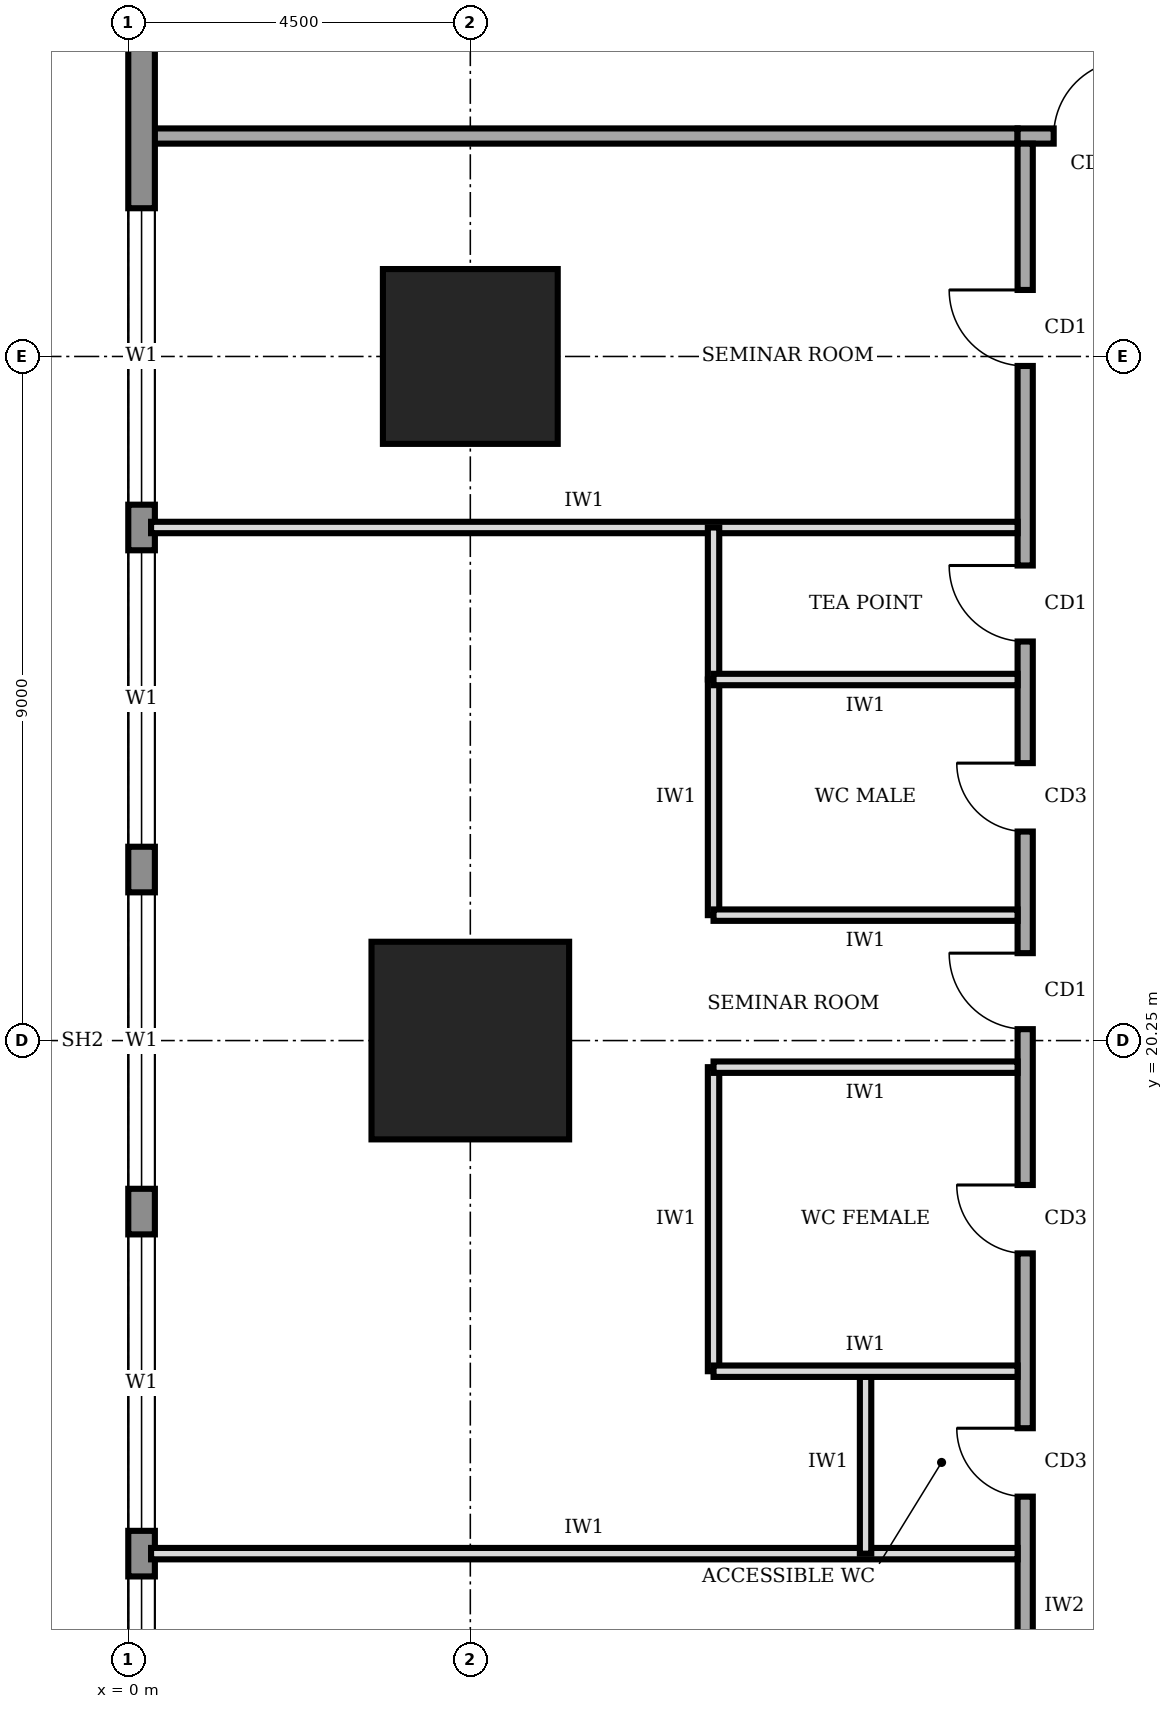
"""IFC4 building model, lengths in metres.
Left out: names, types, materials, properties, quantities, classifications, styles, units other than length and angle.
Written with IfcOpenShell. Run it as: python <this file> out.ifc"""

import sys

from ifc_helpers import new_model, si_unit, direction, frame, frame_2d, origin, origin_2d, place, context, subcontext, project, spatial, rectangle, extrude, element, fill, save


model = new_model("IFC4")
c1 = context("Model", 3, precision=1e-05, world=origin(), true_north=direction((0.0, 1.0)))
c2 = subcontext(c1, "Body", "Model", "MODEL_VIEW")
j1 = project(units=[si_unit("LENGTHUNIT", "METRE"), si_unit("PLANEANGLEUNIT", "RADIAN")], contexts=[c1])
p1 = place(None, origin())
s1 = spatial("IfcSite", under=j1, at=p1, CompositionType="ELEMENT")
p2 = place(p1, origin())
s2 = spatial("IfcBuilding", under=s1, at=p2, CompositionType="ELEMENT")
p3 = place(p2, frame((0.0, 0.0, 113.0)))
s3 = spatial("IfcBuildingStorey", under=s2, at=p3, CompositionType="ELEMENT", Elevation=113.0)
p4 = place(p3, frame((4.5, 20.25, 0.0), z_axis=(0.0, 0.0, 1.0), x_axis=(1.0, 0.0, 0.0)))
e1 = element("IfcColumn", 1, at=p4, inside=s3, PredefinedType="COLUMN", context=c2, shape_type="SweptSolid", body=[
    extrude(rectangle(XDim=2.6, YDim=2.6, at=origin_2d()), origin(), (0.0, 0.0, 1.0), 4.0),
])
p5 = place(p3, frame((4.5, 29.25, 0.0), z_axis=(0.0, 0.0, 1.0), x_axis=(1.0, 0.0, 0.0)))
e2 = element("IfcColumn", 2, at=p5, inside=s3, PredefinedType="COLUMN", context=c2, shape_type="SweptSolid", body=[
    extrude(rectangle(XDim=2.3, YDim=2.3, at=origin_2d()), origin(), (0.0, 0.0, 1.0), 4.0),
])
p6 = place(p3, frame((0.175, 35.98, 0.0), z_axis=(0.0, 0.0, 1.0), x_axis=(0.0, -1.0, 0.0)))
e3 = element("IfcWall", 3, at=p6, inside=s3, PredefinedType="STANDARD", context=c2, shape_type="SweptSolid", body=[
    extrude(rectangle(XDim=31.46, YDim=0.35, at=frame_2d((15.73, 0.0))), origin(), (0.0, 0.0, 1.0), 3.75),
])
p7 = place(p6, frame((27.21, 0.0, 0.9)))
e4 = element("IfcOpeningElement", 4, at=p7, cuts=e3, PredefinedType="OPENING", context=c2, shape_type="SweptSolid", body=[
    extrude(rectangle(XDim=3.9, YDim=2.2, at=frame_2d((1.95, 1.1))), frame((0.0, 0.185, 0.0), z_axis=(0.0, -1.0, 0.0), x_axis=(1.0, 0.0, 0.0)), (0.0, 0.0, 1.0), 0.37),
])
p8 = place(p6, frame((22.78, 0.0, 0.9)))
e5 = element("IfcOpeningElement", 5, at=p8, cuts=e3, PredefinedType="OPENING", context=c2, shape_type="SweptSolid", body=[
    extrude(rectangle(XDim=3.9, YDim=2.2, at=frame_2d((1.95, 1.1))), frame((0.0, 0.185, 0.0), z_axis=(0.0, -1.0, 0.0), x_axis=(1.0, 0.0, 0.0)), (0.0, 0.0, 1.0), 0.37),
])
p9 = place(p6, frame((18.28, 0.0, 0.9)))
e6 = element("IfcOpeningElement", 6, at=p9, cuts=e3, PredefinedType="OPENING", context=c2, shape_type="SweptSolid", body=[
    extrude(rectangle(XDim=3.9, YDim=2.2, at=frame_2d((1.95, 1.1))), frame((0.0, 0.185, 0.0), z_axis=(0.0, -1.0, 0.0), x_axis=(1.0, 0.0, 0.0)), (0.0, 0.0, 1.0), 0.37),
])
p10 = place(p6, frame((13.78, 0.0, 0.9)))
e7 = element("IfcOpeningElement", 7, at=p10, cuts=e3, PredefinedType="OPENING", context=c2, shape_type="SweptSolid", body=[
    extrude(rectangle(XDim=3.9, YDim=2.2, at=frame_2d((1.95, 1.1))), frame((0.0, 0.185, 0.0), z_axis=(0.0, -1.0, 0.0), x_axis=(1.0, 0.0, 0.0)), (0.0, 0.0, 1.0), 0.37),
])
p11 = place(p6, frame((9.28, 0.0, 0.9)))
e8 = element("IfcOpeningElement", 8, at=p11, cuts=e3, PredefinedType="OPENING", context=c2, shape_type="SweptSolid", body=[
    extrude(rectangle(XDim=3.9, YDim=2.2, at=frame_2d((1.95, 1.1))), frame((0.0, 0.185, 0.0), z_axis=(0.0, -1.0, 0.0), x_axis=(1.0, 0.0, 0.0)), (0.0, 0.0, 1.0), 0.37),
])
p12 = place(p6, frame((4.78, 0.0, 0.9)))
e9 = element("IfcOpeningElement", 9, at=p12, cuts=e3, PredefinedType="OPENING", context=c2, shape_type="SweptSolid", body=[
    extrude(rectangle(XDim=3.9, YDim=2.2, at=frame_2d((1.95, 1.1))), frame((0.0, 0.185, 0.0), z_axis=(0.0, -1.0, 0.0), x_axis=(1.0, 0.0, 0.0)), (0.0, 0.0, 1.0), 0.37),
])
p13 = place(p3, frame((28.6, 32.15, 0.0), z_axis=(0.0, 0.0, 1.0), x_axis=(-1.0, 0.0, 0.0)))
e10 = element("IfcWall", 10, at=p13, inside=s3, PredefinedType="SOLIDWALL", context=c2, shape_type="SweptSolid", body=[
    extrude(rectangle(XDim=16.9, YDim=0.2, at=frame_2d((8.45, 0.0))), origin(), (0.0, 0.0, 1.0), 3.75),
])
p14 = place(p13, frame((15.425, 0.0, 0.0)))
e11 = element("IfcOpeningElement", 11, at=p14, cuts=e10, PredefinedType="OPENING", context=c2, shape_type="SweptSolid", body=[
    extrude(rectangle(XDim=1.0, YDim=2.1, at=frame_2d((0.5, 1.05))), frame((0.0, 0.11, 0.0), z_axis=(0.0, -1.0, 0.0), x_axis=(1.0, 0.0, 0.0)), (0.0, 0.0, 1.0), 0.22),
])
p15 = place(p13, frame((12.35, 0.0, 0.0)))
e12 = element("IfcOpeningElement", 12, at=p15, cuts=e10, PredefinedType="OPENING", context=c2, shape_type="SweptSolid", body=[
    extrude(rectangle(XDim=1.0, YDim=2.1, at=frame_2d((0.5, 1.05))), frame((0.0, 0.11, 0.0), z_axis=(0.0, -1.0, 0.0), x_axis=(1.0, 0.0, 0.0)), (0.0, 0.0, 1.0), 0.22),
])
p16 = place(p13, frame((5.6, 0.0, 0.0)))
e13 = element("IfcOpeningElement", 13, at=p16, cuts=e10, PredefinedType="OPENING", context=c2, shape_type="SweptSolid", body=[
    extrude(rectangle(XDim=1.0, YDim=2.1, at=frame_2d((0.5, 1.05))), frame((0.0, 0.11, 0.0), z_axis=(0.0, -1.0, 0.0), x_axis=(1.0, 0.0, 0.0)), (0.0, 0.0, 1.0), 0.22),
])
p17 = place(p13, frame((0.275, 0.0, 0.0)))
e14 = element("IfcOpeningElement", 14, at=p17, cuts=e10, PredefinedType="OPENING", context=c2, shape_type="SweptSolid", body=[
    extrude(rectangle(XDim=1.0, YDim=2.1, at=frame_2d((0.5, 1.05))), frame((0.0, 0.11, 0.0), z_axis=(0.0, -1.0, 0.0), x_axis=(1.0, 0.0, 0.0)), (0.0, 0.0, 1.0), 0.22),
])
p18 = place(p3, frame((11.8, 32.05, 0.0), z_axis=(0.0, 0.0, 1.0), x_axis=(0.0, -1.0, 0.0)))
e15 = element("IfcWall", 15, at=p18, inside=s3, PredefinedType="SOLIDWALL", context=c2, shape_type="SweptSolid", body=[
    extrude(rectangle(XDim=23.8, YDim=0.2, at=frame_2d((11.9, 0.0))), origin(), (0.0, 0.0, 1.0), 3.75),
])
p19 = place(p18, frame((20.675, 0.0, 0.0)))
e16 = element("IfcOpeningElement", 16, at=p19, cuts=e15, PredefinedType="OPENING", context=c2, shape_type="SweptSolid", body=[
    extrude(rectangle(XDim=1.0, YDim=2.1, at=frame_2d((0.5, 1.05))), frame((0.0, 0.11, 0.0), z_axis=(0.0, -1.0, 0.0), x_axis=(1.0, 0.0, 0.0)), (0.0, 0.0, 1.0), 0.22),
])
p20 = place(p18, frame((16.9, 0.0, 0.0)))
e17 = element("IfcOpeningElement", 17, at=p20, cuts=e15, PredefinedType="OPENING", context=c2, shape_type="SweptSolid", body=[
    extrude(rectangle(XDim=0.9, YDim=2.1, at=frame_2d((0.45, 1.05))), frame((0.0, 0.11, 0.0), z_axis=(0.0, -1.0, 0.0), x_axis=(1.0, 0.0, 0.0)), (0.0, 0.0, 1.0), 0.22),
])
p21 = place(p18, frame((13.7, 0.0, 0.0)))
e18 = element("IfcOpeningElement", 18, at=p21, cuts=e15, PredefinedType="OPENING", context=c2, shape_type="SweptSolid", body=[
    extrude(rectangle(XDim=0.9, YDim=2.1, at=frame_2d((0.45, 1.05))), frame((0.0, 0.11, 0.0), z_axis=(0.0, -1.0, 0.0), x_axis=(1.0, 0.0, 0.0)), (0.0, 0.0, 1.0), 0.22),
])
p22 = place(p18, frame((8.15, 0.0, 0.0)))
e19 = element("IfcOpeningElement", 19, at=p22, cuts=e15, PredefinedType="OPENING", context=c2, shape_type="SweptSolid", body=[
    extrude(rectangle(XDim=0.9, YDim=2.1, at=frame_2d((0.45, 1.05))), frame((0.0, 0.11, 0.0), z_axis=(0.0, -1.0, 0.0), x_axis=(1.0, 0.0, 0.0)), (0.0, 0.0, 1.0), 0.22),
])
p23 = place(p18, frame((5.55, 0.0, 0.0)))
e20 = element("IfcOpeningElement", 20, at=p23, cuts=e15, PredefinedType="OPENING", context=c2, shape_type="SweptSolid", body=[
    extrude(rectangle(XDim=1.0, YDim=2.1, at=frame_2d((0.5, 1.05))), frame((0.0, 0.11, 0.0), z_axis=(0.0, -1.0, 0.0), x_axis=(1.0, 0.0, 0.0)), (0.0, 0.0, 1.0), 0.22),
])
p24 = place(p18, frame((10.65, 0.0, 0.0)))
e21 = element("IfcOpeningElement", 21, at=p24, cuts=e15, PredefinedType="OPENING", context=c2, shape_type="SweptSolid", body=[
    extrude(rectangle(XDim=1.0, YDim=2.1, at=frame_2d((0.5, 1.05))), frame((0.0, 0.11, 0.0), z_axis=(0.0, -1.0, 0.0), x_axis=(1.0, 0.0, 0.0)), (0.0, 0.0, 1.0), 0.22),
])
p25 = place(p18, frame((1.925, 0.0, 0.0)))
e22 = element("IfcOpeningElement", 22, at=p25, cuts=e15, PredefinedType="OPENING", context=c2, shape_type="SweptSolid", body=[
    extrude(rectangle(XDim=1.0, YDim=2.1, at=frame_2d((0.5, 1.05))), frame((0.0, 0.11, 0.0), z_axis=(0.0, -1.0, 0.0), x_axis=(1.0, 0.0, 0.0)), (0.0, 0.0, 1.0), 0.22),
])
p26 = place(p3, frame((0.3, 32.15, 0.0), z_axis=(0.0, 0.0, 1.0), x_axis=(1.0, 0.0, 0.0)))
e23 = element("IfcWall", 23, at=p26, inside=s3, PredefinedType="SOLIDWALL", context=c2, shape_type="SweptSolid", body=[
    extrude(rectangle(XDim=11.4, YDim=0.2, at=frame_2d((5.7, 0.0))), origin(), (0.0, 0.0, 1.0), 3.75),
])
for number, where, z_axis, x_axis in (
    (24, (0.3, 13.5, 0.0), (0.0, 0.0, 1.0), (1.0, 0.0, 0.0)),
    (25, (0.3, 27.0, 0.0), (0.0, 0.0, 1.0), (1.0, 0.0, 0.0)),
):
    element("IfcWall", number, at=place(p3, frame(where, z_axis=z_axis, x_axis=x_axis)), inside=s3, PredefinedType="PARTITIONING", context=c2, shape_type="SweptSolid", body=[
        extrude(rectangle(XDim=11.4, YDim=0.15, at=frame_2d((5.7, 0.0))), origin(), (0.0, 0.0, 1.0), 3.75),
    ])
p27 = place(p3, frame((11.7, 15.9, 0.0), z_axis=(0.0, 0.0, 1.0), x_axis=(-1.0, 0.0, 0.0)))
e26 = element("IfcWall", 26, at=p27, inside=s3, PredefinedType="PARTITIONING", context=c2, shape_type="SweptSolid", body=[
    extrude(rectangle(XDim=4.0, YDim=0.15, at=frame_2d((2.0, 0.0))), origin(), (0.0, 0.0, 1.0), 3.75),
])
p28 = place(p3, frame((11.7, 19.9, 0.0), z_axis=(0.0, 0.0, 1.0), x_axis=(-1.0, 0.0, 0.0)))
e27 = element("IfcWall", 27, at=p28, inside=s3, PredefinedType="PARTITIONING", context=c2, shape_type="SweptSolid", body=[
    extrude(rectangle(XDim=4.0, YDim=0.15, at=frame_2d((2.0, 0.0))), origin(), (0.0, 0.0, 1.0), 2.85),
])
for number, where, z_axis, x_axis in (
    (28, (11.7, 21.9, 0.0), (0.0, 0.0, 1.0), (-1.0, 0.0, 0.0)),
    (29, (11.7, 25.0, 0.0), (0.0, 0.0, 1.0), (-1.0, 0.0, 0.0)),
):
    element("IfcWall", number, at=place(p3, frame(where, z_axis=z_axis, x_axis=x_axis)), inside=s3, PredefinedType="PARTITIONING", context=c2, shape_type="SweptSolid", body=[
        extrude(rectangle(XDim=4.0, YDim=0.15, at=frame_2d((2.0, 0.0))), origin(), (0.0, 0.0, 1.0), 3.75),
    ])
p29 = place(p3, frame((9.7, 13.5, 0.0), z_axis=(0.0, 0.0, 1.0), x_axis=(0.0, 1.0, 0.0)))
e30 = element("IfcWall", 30, at=p29, inside=s3, PredefinedType="PARTITIONING", context=c2, shape_type="SweptSolid", body=[
    extrude(rectangle(XDim=2.4, YDim=0.15, at=frame_2d((1.2, 0.0))), origin(), (0.0, 0.0, 1.0), 3.75),
])
p30 = place(p3, frame((7.7, 15.9, 0.0), z_axis=(0.0, 0.0, 1.0), x_axis=(0.0, 1.0, 0.0)))
e31 = element("IfcWall", 31, at=p30, inside=s3, PredefinedType="PARTITIONING", context=c2, shape_type="SweptSolid", body=[
    extrude(rectangle(XDim=4.0, YDim=0.15, at=frame_2d((2.0, 0.0))), origin(), (0.0, 0.0, 1.0), 3.75),
])
p31 = place(p3, frame((7.7, 21.9, 0.0), z_axis=(0.0, 0.0, 1.0), x_axis=(0.0, 1.0, 0.0)))
e32 = element("IfcWall", 32, at=p31, inside=s3, PredefinedType="PARTITIONING", context=c2, shape_type="SweptSolid", body=[
    extrude(rectangle(XDim=3.1, YDim=0.15, at=frame_2d((1.55, 0.0))), origin(), (0.0, 0.0, 1.0), 3.75),
])
p32 = place(p3, frame((7.7, 25.0, 0.0), z_axis=(0.0, 0.0, 1.0), x_axis=(0.0, 1.0, 0.0)))
e33 = element("IfcWall", 33, at=p32, inside=s3, PredefinedType="PARTITIONING", context=c2, shape_type="SweptSolid", body=[
    extrude(rectangle(XDim=2.0, YDim=0.15, at=frame_2d((1.0, 0.0))), origin(), (0.0, 0.0, 1.0), 3.75),
])
p33 = place(p8, origin())
e34 = element("IfcWindow", 34, at=p33, inside=s3, PartitioningType="SINGLE_PANEL", PredefinedType="WINDOW", context=c2, shape_type="SweptSolid", body=[
    extrude(rectangle(XDim=3.9, YDim=2.2, at=frame_2d((1.95, 1.1))), frame((0.0, 0.03, 0.0), z_axis=(0.0, -1.0, 0.0), x_axis=(1.0, 0.0, 0.0)), (0.0, 0.0, 1.0), 0.06),
])
fill(e5, e34)
p34 = place(p9, origin())
e35 = element("IfcWindow", 35, at=p34, inside=s3, PartitioningType="SINGLE_PANEL", PredefinedType="WINDOW", context=c2, shape_type="SweptSolid", body=[
    extrude(rectangle(XDim=3.9, YDim=2.2, at=frame_2d((1.95, 1.1))), frame((0.0, 0.03, 0.0), z_axis=(0.0, -1.0, 0.0), x_axis=(1.0, 0.0, 0.0)), (0.0, 0.0, 1.0), 0.06),
])
fill(e6, e35)
p35 = place(p10, origin())
e36 = element("IfcWindow", 36, at=p35, inside=s3, PartitioningType="SINGLE_PANEL", PredefinedType="WINDOW", context=c2, shape_type="SweptSolid", body=[
    extrude(rectangle(XDim=3.9, YDim=2.2, at=frame_2d((1.95, 1.1))), frame((0.0, 0.03, 0.0), z_axis=(0.0, -1.0, 0.0), x_axis=(1.0, 0.0, 0.0)), (0.0, 0.0, 1.0), 0.06),
])
fill(e7, e36)
p36 = place(p11, origin())
e37 = element("IfcWindow", 37, at=p36, inside=s3, PartitioningType="SINGLE_PANEL", PredefinedType="WINDOW", context=c2, shape_type="SweptSolid", body=[
    extrude(rectangle(XDim=3.9, YDim=2.2, at=frame_2d((1.95, 1.1))), frame((0.0, 0.03, 0.0), z_axis=(0.0, -1.0, 0.0), x_axis=(1.0, 0.0, 0.0)), (0.0, 0.0, 1.0), 0.06),
])
fill(e8, e37)
p37 = place(p12, origin())
e38 = element("IfcWindow", 38, at=p37, inside=s3, PartitioningType="SINGLE_PANEL", PredefinedType="WINDOW", context=c2, shape_type="SweptSolid", body=[
    extrude(rectangle(XDim=3.9, YDim=2.2, at=frame_2d((1.95, 1.1))), frame((0.0, 0.03, 0.0), z_axis=(0.0, -1.0, 0.0), x_axis=(1.0, 0.0, 0.0)), (0.0, 0.0, 1.0), 0.06),
])
fill(e9, e38)
p38 = place(p14, frame((1.0, 0.0, 0.0), z_axis=(0.0, 0.0, 1.0), x_axis=(-1.0, 0.0, 0.0)))
e39 = element("IfcDoor", 39, at=p38, inside=s3, OperationType="SINGLE_SWING_RIGHT", PredefinedType="DOOR", context=c2, shape_type="SweptSolid", body=[
    extrude(rectangle(XDim=1.0, YDim=2.1, at=frame_2d((0.5, 1.05))), frame((0.0, 0.025, 0.0), z_axis=(0.0, -1.0, 0.0), x_axis=(1.0, 0.0, 0.0)), (0.0, 0.0, 1.0), 0.05),
])
fill(e11, e39)
p39 = place(p20, frame((0.9, 0.0, 0.0), z_axis=(0.0, 0.0, 1.0), x_axis=(-1.0, 0.0, 0.0)))
e40 = element("IfcDoor", 40, at=p39, inside=s3, OperationType="SINGLE_SWING_RIGHT", PredefinedType="DOOR", context=c2, shape_type="SweptSolid", body=[
    extrude(rectangle(XDim=0.9, YDim=2.1, at=frame_2d((0.45, 1.05))), frame((0.0, 0.025, 0.0), z_axis=(0.0, -1.0, 0.0), x_axis=(1.0, 0.0, 0.0)), (0.0, 0.0, 1.0), 0.05),
])
fill(e17, e40)
p40 = place(p21, frame((0.9, 0.0, 0.0), z_axis=(0.0, 0.0, 1.0), x_axis=(-1.0, 0.0, 0.0)))
e41 = element("IfcDoor", 41, at=p40, inside=s3, OperationType="SINGLE_SWING_RIGHT", PredefinedType="DOOR", context=c2, shape_type="SweptSolid", body=[
    extrude(rectangle(XDim=0.9, YDim=2.1, at=frame_2d((0.45, 1.05))), frame((0.0, 0.025, 0.0), z_axis=(0.0, -1.0, 0.0), x_axis=(1.0, 0.0, 0.0)), (0.0, 0.0, 1.0), 0.05),
])
fill(e18, e41)
p41 = place(p22, frame((0.9, 0.0, 0.0), z_axis=(0.0, 0.0, 1.0), x_axis=(-1.0, 0.0, 0.0)))
e42 = element("IfcDoor", 42, at=p41, inside=s3, OperationType="SINGLE_SWING_RIGHT", PredefinedType="DOOR", context=c2, shape_type="SweptSolid", body=[
    extrude(rectangle(XDim=0.9, YDim=2.1, at=frame_2d((0.45, 1.05))), frame((0.0, 0.025, 0.0), z_axis=(0.0, -1.0, 0.0), x_axis=(1.0, 0.0, 0.0)), (0.0, 0.0, 1.0), 0.05),
])
fill(e19, e42)
p42 = place(p23, frame((1.0, 0.0, 0.0), z_axis=(0.0, 0.0, 1.0), x_axis=(-1.0, 0.0, 0.0)))
e43 = element("IfcDoor", 43, at=p42, inside=s3, OperationType="SINGLE_SWING_RIGHT", PredefinedType="DOOR", context=c2, shape_type="SweptSolid", body=[
    extrude(rectangle(XDim=1.0, YDim=2.1, at=frame_2d((0.5, 1.05))), frame((0.0, 0.025, 0.0), z_axis=(0.0, -1.0, 0.0), x_axis=(1.0, 0.0, 0.0)), (0.0, 0.0, 1.0), 0.05),
])
fill(e20, e43)
p43 = place(p24, frame((1.0, 0.0, 0.0), z_axis=(0.0, 0.0, 1.0), x_axis=(-1.0, 0.0, 0.0)))
e44 = element("IfcDoor", 44, at=p43, inside=s3, OperationType="SINGLE_SWING_RIGHT", PredefinedType="DOOR", context=c2, shape_type="SweptSolid", body=[
    extrude(rectangle(XDim=1.0, YDim=2.1, at=frame_2d((0.5, 1.05))), frame((0.0, 0.025, 0.0), z_axis=(0.0, -1.0, 0.0), x_axis=(1.0, 0.0, 0.0)), (0.0, 0.0, 1.0), 0.05),
])
fill(e21, e44)
p44 = place(p25, frame((1.0, 0.0, 0.0), z_axis=(0.0, 0.0, 1.0), x_axis=(-1.0, 0.0, 0.0)))
e45 = element("IfcDoor", 45, at=p44, inside=s3, OperationType="SINGLE_SWING_RIGHT", PredefinedType="DOOR", context=c2, shape_type="SweptSolid", body=[
    extrude(rectangle(XDim=1.0, YDim=2.1, at=frame_2d((0.5, 1.05))), frame((0.0, 0.025, 0.0), z_axis=(0.0, -1.0, 0.0), x_axis=(1.0, 0.0, 0.0)), (0.0, 0.0, 1.0), 0.05),
])
fill(e22, e45)
save(model, sys.argv[1])
